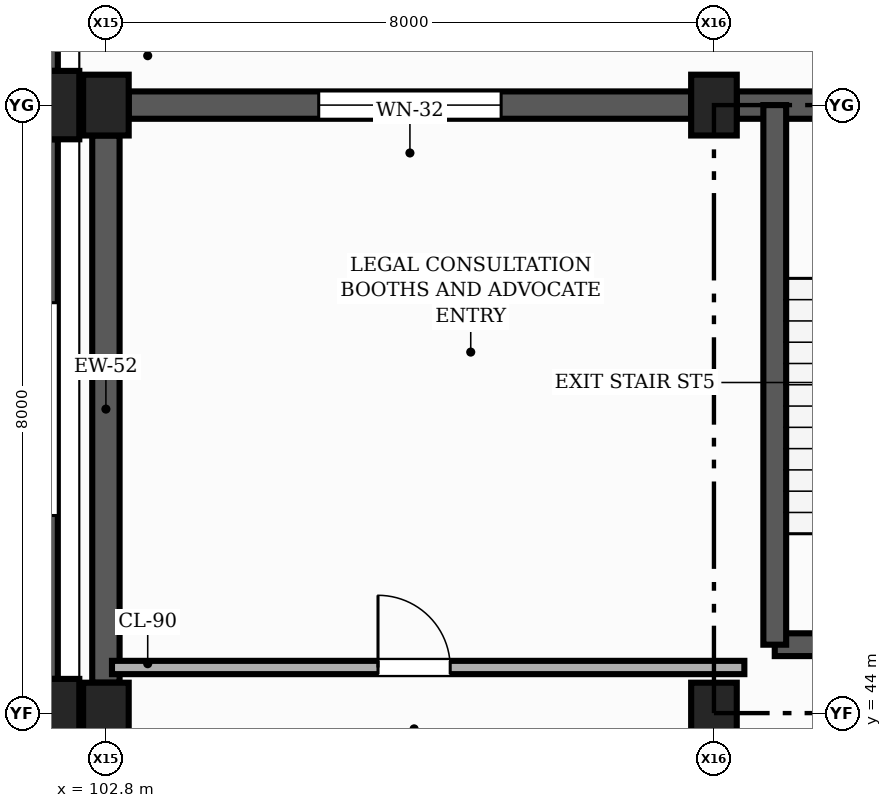
"""IFC4 building model, lengths in metres.
Left out: names, types, materials, properties, quantities, classifications, styles, units other than length and angle.
Written with IfcOpenShell. Run it as: python <this file> out.ifc"""

import sys

from ifc_helpers import new_model, si_unit, direction, frame, frame_2d, origin, origin_2d, place, context, subcontext, project, spatial, rectangle, extrude, element, fill, save


model = new_model("IFC4")
c1 = context("Model", 3, precision=1e-05, world=origin(), true_north=direction((0.0, 1.0)))
c2 = subcontext(c1, "Body", "Model", "MODEL_VIEW")
j1 = project(units=[si_unit("LENGTHUNIT", "METRE"), si_unit("PLANEANGLEUNIT", "RADIAN")], contexts=[c1])
p1 = place(None, origin())
s1 = spatial("IfcSite", under=j1, at=p1, CompositionType="ELEMENT")
p2 = place(p1, origin())
s2 = spatial("IfcBuilding", under=s1, at=p2, CompositionType="ELEMENT")
p3 = place(p2, origin())
s3 = spatial("IfcBuildingStorey", under=s2, at=p3, CompositionType="ELEMENT", Elevation=0.0)
for number, where, z_axis, x_axis in (
    (1, (102.0, 44.0, 0.0), (0.0, 0.0, 1.0), (1.0, 0.0, 0.0)),
    (2, (102.0, 52.0, 0.0), (0.0, 0.0, 1.0), (1.0, 0.0, 0.0)),
):
    element("IfcColumn", number, at=place(p3, frame(where, z_axis=z_axis, x_axis=x_axis)), inside=s3, PredefinedType="COLUMN", context=c2, shape_type="SweptSolid", body=[
        extrude(rectangle(XDim=0.9, YDim=0.9, at=origin_2d()), origin(), (0.0, 0.0, 1.0), 4.8),
    ])
for number, where, z_axis, x_axis in (
    (3, (102.8, 44.0, -0.5), (0.0, 0.0, 1.0), (1.0, 0.0, 0.0)),
    (4, (102.8, 52.0, -0.5), (0.0, 0.0, 1.0), (1.0, 0.0, 0.0)),
    (5, (110.8, 44.0, -0.5), (0.0, 0.0, 1.0), (1.0, 0.0, 0.0)),
    (6, (110.8, 52.0, -0.5), (0.0, 0.0, 1.0), (1.0, 0.0, 0.0)),
):
    element("IfcColumn", number, at=place(p3, frame(where, z_axis=z_axis, x_axis=x_axis)), inside=s3, PredefinedType="COLUMN", context=c2, shape_type="SweptSolid", body=[
        extrude(rectangle(XDim=0.6, YDim=0.8, at=origin_2d()), origin(), (0.0, 0.0, 1.0), 5.3),
    ])
p4 = place(p3, frame((102.0, 44.45, 0.0), z_axis=(0.0, 0.0, 1.0), x_axis=(0.0, 1.0, 0.0)))
e7 = element("IfcWall", 7, at=p4, inside=s3, PredefinedType="SOLIDWALL", context=c2, shape_type="SweptSolid", body=[
    extrude(rectangle(XDim=7.1, YDim=0.335, at=frame_2d((3.55, 0.0))), origin(), (0.0, 0.0, 1.0), 3.88),
])
p5 = place(p4, frame((2.15, 0.0, 0.9)))
e8 = element("IfcOpeningElement", 8, at=p5, cuts=e7, PredefinedType="OPENING", context=c2, shape_type="SweptSolid", body=[
    extrude(rectangle(XDim=2.8, YDim=1.8, at=frame_2d((1.4, 0.9))), frame((0.0, 0.177, 0.0), z_axis=(0.0, -1.0, 0.0), x_axis=(1.0, 0.0, 0.0)), (0.0, 0.0, 1.0), 0.355),
])
p6 = place(p3, frame((102.0, 52.45, 0.0), z_axis=(0.0, 0.0, 1.0), x_axis=(0.0, 1.0, 0.0)))
e9 = element("IfcWall", 9, at=p6, inside=s3, PredefinedType="SOLIDWALL", context=c2, shape_type="SweptSolid", body=[
    extrude(rectangle(XDim=7.1, YDim=0.335, at=frame_2d((3.55, 0.0))), origin(), (0.0, 0.0, 1.0), 3.88),
])
p7 = place(p6, frame((2.15, 0.0, 0.9)))
e10 = element("IfcOpeningElement", 10, at=p7, cuts=e9, PredefinedType="OPENING", context=c2, shape_type="SweptSolid", body=[
    extrude(rectangle(XDim=2.8, YDim=1.8, at=frame_2d((1.4, 0.9))), frame((0.0, 0.177, 0.0), z_axis=(0.0, -1.0, 0.0), x_axis=(1.0, 0.0, 0.0)), (0.0, 0.0, 1.0), 0.355),
])
p8 = place(p3, frame((118.5, 52.0, -0.42), z_axis=(0.0, 0.0, 1.0), x_axis=(-1.0, 0.0, 0.0)))
e11 = element("IfcWall", 11, at=p8, inside=s3, PredefinedType="SOLIDWALL", context=c2, shape_type="SweptSolid", body=[
    extrude(rectangle(XDim=7.4, YDim=0.36, at=frame_2d((3.7, 0.0))), origin(), (0.0, 0.0, 1.0), 4.95),
])
p9 = place(p8, frame((4.665, 0.0, 0.42)))
e12 = element("IfcOpeningElement", 12, at=p9, cuts=e11, PredefinedType="OPENING", context=c2, shape_type="SweptSolid", body=[
    extrude(rectangle(XDim=1.35, YDim=2.15, at=frame_2d((0.675, 1.075))), frame((0.0, 0.19, 0.0), z_axis=(0.0, -1.0, 0.0), x_axis=(1.0, 0.0, 0.0)), (0.0, 0.0, 1.0), 0.38),
])
p10 = place(p3, frame((110.5, 52.0, -0.42), z_axis=(0.0, 0.0, 1.0), x_axis=(-1.0, 0.0, 0.0)))
e13 = element("IfcWall", 13, at=p10, inside=s3, PredefinedType="SOLIDWALL", context=c2, shape_type="SweptSolid", body=[
    extrude(rectangle(XDim=7.4, YDim=0.36, at=frame_2d((3.7, 0.0))), origin(), (0.0, 0.0, 1.0), 4.13),
])
p11 = place(p10, frame((2.5, 0.0, 2.52)))
e14 = element("IfcOpeningElement", 14, at=p11, cuts=e13, PredefinedType="OPENING", context=c2, shape_type="SweptSolid", body=[
    extrude(rectangle(XDim=2.4, YDim=0.75, at=frame_2d((1.2, 0.375))), frame((0.0, 0.19, 0.0), z_axis=(0.0, -1.0, 0.0), x_axis=(1.0, 0.0, 0.0)), (0.0, 0.0, 1.0), 0.38),
])
p12 = place(p3, frame((102.8, 51.6, -0.42), z_axis=(0.0, 0.0, 1.0), x_axis=(0.0, -1.0, 0.0)))
e15 = element("IfcWall", 15, at=p12, inside=s3, PredefinedType="SOLIDWALL", context=c2, shape_type="SweptSolid", body=[
    extrude(rectangle(XDim=7.2, YDim=0.36, at=frame_2d((3.6, 0.0))), origin(), (0.0, 0.0, 1.0), 4.23),
])
p13 = place(p3, frame((111.6, 44.9, -0.52), z_axis=(0.0, 0.0, 1.0), x_axis=(1.0, 0.0, 0.0)))
e16 = element("IfcWall", 16, at=p13, inside=s3, PredefinedType="SHEAR", context=c2, shape_type="SweptSolid", body=[
    extrude(rectangle(XDim=3.12, YDim=0.3, at=frame_2d((1.56, 0.0))), origin(), (0.0, 0.0, 1.0), 5.32),
])
p14 = place(p13, frame((0.985, 0.0, 0.52)))
e17 = element("IfcOpeningElement", 17, at=p14, cuts=e16, PredefinedType="OPENING", context=c2, shape_type="SweptSolid", body=[
    extrude(rectangle(XDim=1.15, YDim=2.15, at=frame_2d((0.575, 1.075))), frame((0.0, 0.16, 0.0), z_axis=(0.0, -1.0, 0.0), x_axis=(1.0, 0.0, 0.0)), (0.0, 0.0, 1.0), 0.32),
])
p15 = place(p3, frame((111.6, 52.0, -0.52), z_axis=(0.0, 0.0, 1.0), x_axis=(0.0, -1.0, 0.0)))
e18 = element("IfcWall", 18, at=p15, inside=s3, PredefinedType="SHEAR", context=c2, shape_type="SweptSolid", body=[
    extrude(rectangle(XDim=7.1, YDim=0.3, at=frame_2d((3.55, 0.0))), origin(), (0.0, 0.0, 1.0), 5.32),
])
p16 = place(p3, frame((102.88, 44.6, 0.0), z_axis=(0.0, 0.0, 1.0), x_axis=(1.0, 0.0, 0.0)))
e19 = element("IfcWall", 19, at=p16, inside=s3, PredefinedType="PARTITIONING", context=c2, shape_type="SweptSolid", body=[
    extrude(rectangle(XDim=8.32, YDim=0.175, at=frame_2d((4.16, 0.0))), origin(), (0.0, 0.0, 1.0), 3.795),
])
p17 = place(p16, frame((3.5, 0.0, 0.0)))
e20 = element("IfcOpeningElement", 20, at=p17, cuts=e19, PredefinedType="OPENING", context=c2, shape_type="SweptSolid", body=[
    extrude(rectangle(XDim=0.95, YDim=2.1, at=frame_2d((0.475, 1.05))), frame((0.0, 0.098, 0.0), z_axis=(0.0, -1.0, 0.0), x_axis=(1.0, 0.0, 0.0)), (0.0, 0.0, 1.0), 0.195),
])
p18 = place(p11, origin())
e21 = element("IfcWindow", 21, at=p18, inside=s3, PartitioningType="SINGLE_PANEL", PredefinedType="WINDOW", context=c2, shape_type="SweptSolid", body=[
    extrude(rectangle(XDim=2.4, YDim=0.75, at=frame_2d((1.2, 0.375))), frame((0.0, 0.03, 0.0), z_axis=(0.0, -1.0, 0.0), x_axis=(1.0, 0.0, 0.0)), (0.0, 0.0, 1.0), 0.06),
])
fill(e14, e21)
p19 = place(p17, origin())
e22 = element("IfcDoor", 22, at=p19, inside=s3, OperationType="SINGLE_SWING_LEFT", PredefinedType="DOOR", context=c2, shape_type="SweptSolid", body=[
    extrude(rectangle(XDim=0.95, YDim=2.1, at=frame_2d((0.475, 1.05))), frame((0.0, 0.025, 0.0), z_axis=(0.0, -1.0, 0.0), x_axis=(1.0, 0.0, 0.0)), (0.0, 0.0, 1.0), 0.05),
])
fill(e20, e22)
save(model, sys.argv[1])
